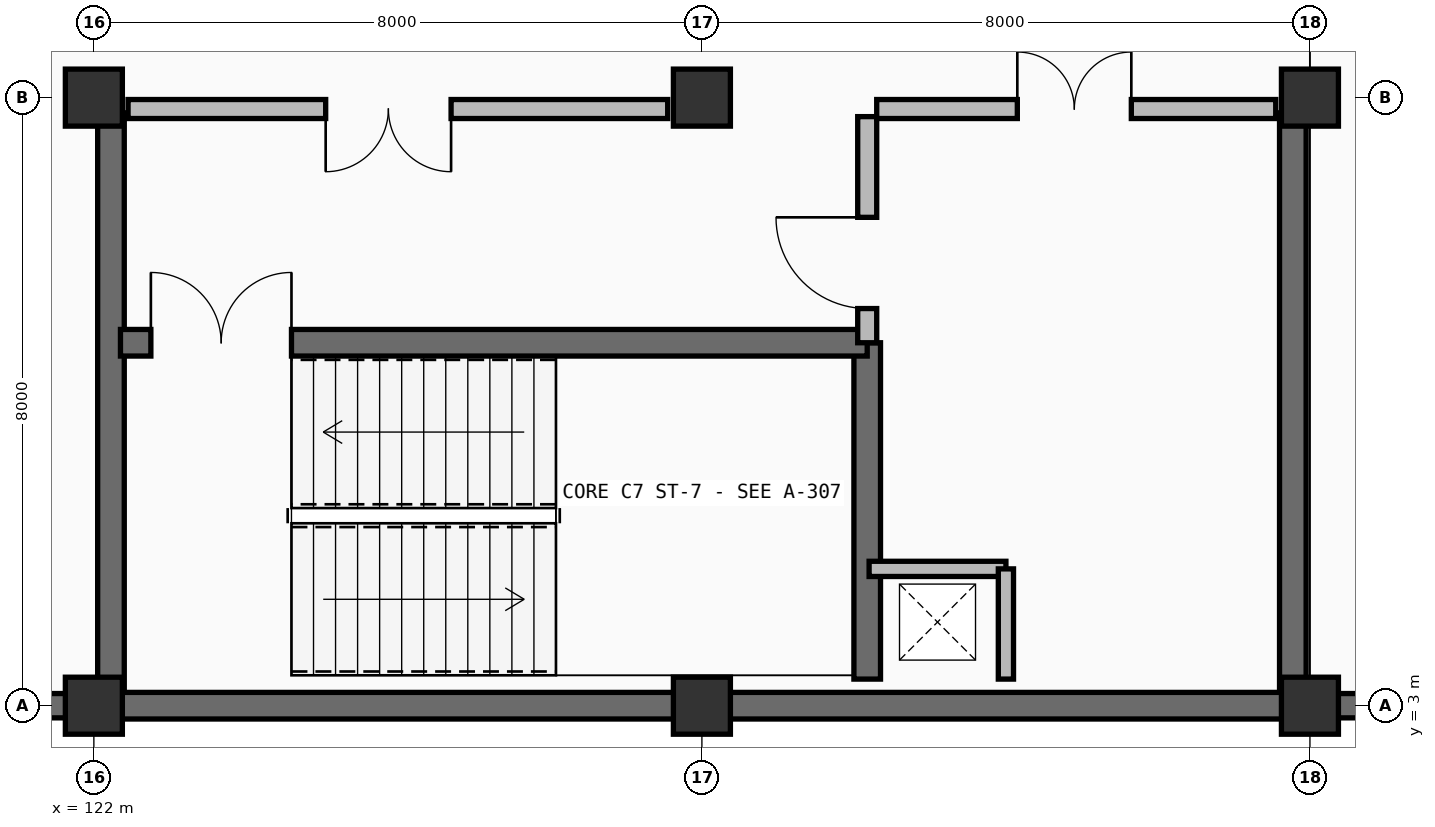
"""IFC4 building model, lengths in metres.
Left out: names, types, materials, properties, quantities, classifications, styles, units other than length and angle.
Written with IfcOpenShell. Run it as: python <this file> out.ifc"""

import sys

from ifc_helpers import new_model, si_unit, direction, frame, frame_2d, origin, origin_2d, place, context, subcontext, project, spatial, rectangle, extrude, element, fill, save


model = new_model("IFC4")
c1 = context("Model", 3, precision=1e-05, world=origin(), true_north=direction((0.0, 1.0)))
c2 = subcontext(c1, "Body", "Model", "MODEL_VIEW")
j1 = project(units=[si_unit("LENGTHUNIT", "METRE"), si_unit("PLANEANGLEUNIT", "RADIAN")], contexts=[c1])
p1 = place(None, origin())
s1 = spatial("IfcSite", under=j1, at=p1, CompositionType="ELEMENT")
p2 = place(p1, origin())
s2 = spatial("IfcBuilding", under=s1, at=p2, CompositionType="ELEMENT")
p3 = place(p2, frame((0.0, 0.0, 5.4)))
s3 = spatial("IfcBuildingStorey", under=s2, at=p3, CompositionType="ELEMENT", Elevation=5.4)
for number, where, z_axis, x_axis in (
    (1, (122.0, 3.0, 0.0), (0.0, 0.0, 1.0), (1.0, 0.0, 0.0)),
    (2, (122.0, 11.0, 0.0), (0.0, 0.0, 1.0), (1.0, 0.0, 0.0)),
    (3, (130.0, 3.0, 0.0), (0.0, 0.0, 1.0), (1.0, 0.0, 0.0)),
    (4, (130.0, 11.0, 0.0), (0.0, 0.0, 1.0), (1.0, 0.0, 0.0)),
    (5, (138.0, 3.0, 0.0), (0.0, 0.0, 1.0), (1.0, 0.0, 0.0)),
    (6, (138.0, 11.0, 0.0), (0.0, 0.0, 1.0), (1.0, 0.0, 0.0)),
):
    element("IfcColumn", number, at=place(p3, frame(where, z_axis=z_axis, x_axis=x_axis)), inside=s3, PredefinedType="COLUMN", context=c2, shape_type="SweptSolid", body=[
        extrude(rectangle(XDim=0.75, YDim=0.75, at=origin_2d()), origin(), (0.0, 0.0, 1.0), 4.5),
    ])
p4 = place(p3, frame((146.0, 3.0, 0.0), z_axis=(0.0, 0.0, 1.0), x_axis=(-1.0, 0.0, 0.0)))
e7 = element("IfcWall", 7, at=p4, inside=s3, PredefinedType="SOLIDWALL", context=c2, shape_type="SweptSolid", body=[
    extrude(rectangle(XDim=8.0, YDim=0.32, at=frame_2d((4.0, 0.0))), origin(), (0.0, 0.0, 1.0), 4.5),
])
p5 = place(p4, frame((1.975, 0.0, 1.0)))
e8 = element("IfcOpeningElement", 8, at=p5, cuts=e7, PredefinedType="OPENING", context=c2, shape_type="SweptSolid", body=[
    extrude(rectangle(XDim=0.85, YDim=1.2, at=frame_2d((0.425, 0.6))), frame((0.0, 0.17, 0.0), z_axis=(0.0, -1.0, 0.0), x_axis=(1.0, 0.0, 0.0)), (0.0, 0.0, 1.0), 0.34),
])
p6 = place(p4, frame((5.175, 0.0, 1.0)))
e9 = element("IfcOpeningElement", 9, at=p6, cuts=e7, PredefinedType="OPENING", context=c2, shape_type="SweptSolid", body=[
    extrude(rectangle(XDim=0.85, YDim=1.2, at=frame_2d((0.425, 0.6))), frame((0.0, 0.17, 0.0), z_axis=(0.0, -1.0, 0.0), x_axis=(1.0, 0.0, 0.0)), (0.0, 0.0, 1.0), 0.34),
])
for number, where, z_axis, x_axis in (
    (10, (138.0, 3.0, 0.0), (0.0, 0.0, 1.0), (-1.0, 0.0, 0.0)),
    (11, (130.0, 3.0, 0.0), (0.0, 0.0, 1.0), (-1.0, 0.0, 0.0)),
):
    element("IfcWall", number, at=place(p3, frame(where, z_axis=z_axis, x_axis=x_axis)), inside=s3, PredefinedType="SHEAR", context=c2, shape_type="SweptSolid", body=[
        extrude(rectangle(XDim=8.0, YDim=0.35, at=frame_2d((4.0, 0.0))), origin(), (0.0, 0.0, 1.0), 4.5),
    ])
p7 = place(p3, frame((122.0, 3.0, 0.0), z_axis=(0.0, 0.0, 1.0), x_axis=(-1.0, 0.0, 0.0)))
e12 = element("IfcWall", 12, at=p7, inside=s3, PredefinedType="SOLIDWALL", context=c2, shape_type="SweptSolid", body=[
    extrude(rectangle(XDim=8.0, YDim=0.32, at=frame_2d((4.0, 0.0))), origin(), (0.0, 0.0, 1.0), 4.5),
])
p8 = place(p7, frame((1.6, 0.0, 1.0)))
e13 = element("IfcOpeningElement", 13, at=p8, cuts=e12, PredefinedType="OPENING", context=c2, shape_type="SweptSolid", body=[
    extrude(rectangle(XDim=1.6, YDim=2.0, at=frame_2d((0.8, 1.0))), frame((0.0, 0.17, 0.0), z_axis=(0.0, -1.0, 0.0), x_axis=(1.0, 0.0, 0.0)), (0.0, 0.0, 1.0), 0.34),
])
p9 = place(p7, frame((4.8, 0.0, 1.0)))
e14 = element("IfcOpeningElement", 14, at=p9, cuts=e12, PredefinedType="OPENING", context=c2, shape_type="SweptSolid", body=[
    extrude(rectangle(XDim=1.6, YDim=2.0, at=frame_2d((0.8, 1.0))), frame((0.0, 0.17, 0.0), z_axis=(0.0, -1.0, 0.0), x_axis=(1.0, 0.0, 0.0)), (0.0, 0.0, 1.0), 0.34),
])
p10 = place(p3, frame((122.225, 3.2, 0.0), z_axis=(0.0, 0.0, 1.0), x_axis=(0.0, 1.0, 0.0)))
e15 = element("IfcWall", 15, at=p10, inside=s3, PredefinedType="SHEAR", context=c2, shape_type="SweptSolid", body=[
    extrude(rectangle(XDim=7.6, YDim=0.35, at=frame_2d((3.8, 0.0))), origin(), (0.0, 0.0, 1.0), 4.2),
])
p11 = place(p3, frame((132.175, 3.35, 0.0), z_axis=(0.0, 0.0, 1.0), x_axis=(0.0, 1.0, 0.0)))
e16 = element("IfcWall", 16, at=p11, inside=s3, PredefinedType="SHEAR", context=c2, shape_type="SweptSolid", body=[
    extrude(rectangle(XDim=4.425, YDim=0.35, at=frame_2d((2.212, 0.0))), origin(), (0.0, 0.0, 1.0), 4.2),
])
p12 = place(p3, frame((137.775, 3.2, 0.0), z_axis=(0.0, 0.0, 1.0), x_axis=(0.0, 1.0, 0.0)))
e17 = element("IfcWall", 17, at=p12, inside=s3, PredefinedType="SHEAR", context=c2, shape_type="SweptSolid", body=[
    extrude(rectangle(XDim=7.6, YDim=0.35, at=frame_2d((3.8, 0.0))), origin(), (0.0, 0.0, 1.0), 4.2),
])
p13 = place(p3, frame((132.2, 4.8, 0.0), z_axis=(0.0, 0.0, 1.0), x_axis=(1.0, 0.0, 0.0)))
e18 = element("IfcWall", 18, at=p13, inside=s3, PredefinedType="PARTITIONING", context=c2, shape_type="SweptSolid", body=[
    extrude(rectangle(XDim=1.8, YDim=0.2, at=frame_2d((0.9, 0.0))), origin(), (0.0, 0.0, 1.0), 4.2),
])
p14 = place(p3, frame((134.0, 3.35, 0.0), z_axis=(0.0, 0.0, 1.0), x_axis=(0.0, 1.0, 0.0)))
e19 = element("IfcWall", 19, at=p14, inside=s3, PredefinedType="PARTITIONING", context=c2, shape_type="SweptSolid", body=[
    extrude(rectangle(XDim=1.45, YDim=0.2, at=frame_2d((0.725, 0.0))), origin(), (0.0, 0.0, 1.0), 4.2),
])
p15 = place(p3, frame((122.35, 7.775, 0.0), z_axis=(0.0, 0.0, 1.0), x_axis=(1.0, 0.0, 0.0)))
e20 = element("IfcWall", 20, at=p15, inside=s3, PredefinedType="SHEAR", context=c2, shape_type="SweptSolid", body=[
    extrude(rectangle(XDim=9.825, YDim=0.35, at=frame_2d((4.913, 0.0))), origin(), (0.0, 0.0, 1.0), 4.2),
])
p16 = place(p15, frame((0.4, 0.0, 0.0)))
e21 = element("IfcOpeningElement", 21, at=p16, cuts=e20, PredefinedType="OPENING", context=c2, shape_type="SweptSolid", body=[
    extrude(rectangle(XDim=1.85, YDim=2.25, at=frame_2d((0.925, 1.125))), frame((0.0, 0.185, 0.0), z_axis=(0.0, -1.0, 0.0), x_axis=(1.0, 0.0, 0.0)), (0.0, 0.0, 1.0), 0.37),
])
p17 = place(p3, frame((132.175, 7.775, 0.0), z_axis=(0.0, 0.0, 1.0), x_axis=(0.0, 1.0, 0.0)))
e22 = element("IfcWall", 22, at=p17, inside=s3, PredefinedType="PARTITIONING", context=c2, shape_type="SweptSolid", body=[
    extrude(rectangle(XDim=2.975, YDim=0.25, at=frame_2d((1.488, 0.0))), origin(), (0.0, 0.0, 1.0), 4.2),
])
p18 = place(p17, frame((0.45, 0.0, 0.0)))
e23 = element("IfcOpeningElement", 23, at=p18, cuts=e22, PredefinedType="OPENING", context=c2, shape_type="SweptSolid", body=[
    extrude(rectangle(XDim=1.2, YDim=2.2, at=frame_2d((0.6, 1.1))), frame((0.0, 0.135, 0.0), z_axis=(0.0, -1.0, 0.0), x_axis=(1.0, 0.0, 0.0)), (0.0, 0.0, 1.0), 0.27),
])
p19 = place(p3, frame((122.45, 10.85, 0.0), z_axis=(0.0, 0.0, 1.0), x_axis=(1.0, 0.0, 0.0)))
e24 = element("IfcWall", 24, at=p19, inside=s3, PredefinedType="PARTITIONING", context=c2, shape_type="SweptSolid", body=[
    extrude(rectangle(XDim=7.1, YDim=0.25, at=frame_2d((3.55, 0.0))), origin(), (0.0, 0.0, 1.0), 3.435),
])
p20 = place(p19, frame((2.6, 0.0, 0.0)))
e25 = element("IfcOpeningElement", 25, at=p20, cuts=e24, PredefinedType="OPENING", context=c2, shape_type="SweptSolid", body=[
    extrude(rectangle(XDim=1.65, YDim=2.25, at=frame_2d((0.825, 1.125))), frame((0.0, 0.135, 0.0), z_axis=(0.0, -1.0, 0.0), x_axis=(1.0, 0.0, 0.0)), (0.0, 0.0, 1.0), 0.27),
])
p21 = place(p3, frame((132.3, 10.85, 0.0), z_axis=(0.0, 0.0, 1.0), x_axis=(1.0, 0.0, 0.0)))
e26 = element("IfcWall", 26, at=p21, inside=s3, PredefinedType="PARTITIONING", context=c2, shape_type="SweptSolid", body=[
    extrude(rectangle(XDim=5.25, YDim=0.25, at=frame_2d((2.625, 0.0))), origin(), (0.0, 0.0, 1.0), 3.435),
])
p22 = place(p21, frame((1.85, 0.0, 0.0)))
e27 = element("IfcOpeningElement", 27, at=p22, cuts=e26, PredefinedType="OPENING", context=c2, shape_type="SweptSolid", body=[
    extrude(rectangle(XDim=1.5, YDim=2.2, at=frame_2d((0.75, 1.1))), frame((0.0, 0.135, 0.0), z_axis=(0.0, -1.0, 0.0), x_axis=(1.0, 0.0, 0.0)), (0.0, 0.0, 1.0), 0.27),
])
p23 = place(p16, origin())
e28 = element("IfcDoor", 28, at=p23, inside=s3, OperationType="DOUBLE_DOOR_SINGLE_SWING", PredefinedType="DOOR", context=c2, shape_type="SweptSolid", body=[
    extrude(rectangle(XDim=1.85, YDim=2.25, at=frame_2d((0.925, 1.125))), frame((0.0, 0.025, 0.0), z_axis=(0.0, -1.0, 0.0), x_axis=(1.0, 0.0, 0.0)), (0.0, 0.0, 1.0), 0.05),
])
fill(e21, e28)
p24 = place(p18, origin())
e29 = element("IfcDoor", 29, at=p24, inside=s3, OperationType="SINGLE_SWING_RIGHT", PredefinedType="DOOR", context=c2, shape_type="SweptSolid", body=[
    extrude(rectangle(XDim=1.2, YDim=2.2, at=frame_2d((0.6, 1.1))), frame((0.0, 0.025, 0.0), z_axis=(0.0, -1.0, 0.0), x_axis=(1.0, 0.0, 0.0)), (0.0, 0.0, 1.0), 0.05),
])
fill(e23, e29)
p25 = place(p20, frame((1.65, 0.0, 0.0), z_axis=(0.0, 0.0, 1.0), x_axis=(-1.0, 0.0, 0.0)))
e30 = element("IfcDoor", 30, at=p25, inside=s3, OperationType="DOUBLE_DOOR_SINGLE_SWING", PredefinedType="DOOR", context=c2, shape_type="SweptSolid", body=[
    extrude(rectangle(XDim=1.65, YDim=2.25, at=frame_2d((0.825, 1.125))), frame((0.0, 0.025, 0.0), z_axis=(0.0, -1.0, 0.0), x_axis=(1.0, 0.0, 0.0)), (0.0, 0.0, 1.0), 0.05),
])
fill(e25, e30)
p26 = place(p22, origin())
e31 = element("IfcDoor", 31, at=p26, inside=s3, OperationType="DOUBLE_DOOR_SINGLE_SWING", PredefinedType="DOOR", context=c2, shape_type="SweptSolid", body=[
    extrude(rectangle(XDim=1.5, YDim=2.2, at=frame_2d((0.75, 1.1))), frame((0.0, 0.025, 0.0), z_axis=(0.0, -1.0, 0.0), x_axis=(1.0, 0.0, 0.0)), (0.0, 0.0, 1.0), 0.05),
])
fill(e27, e31)
save(model, sys.argv[1])
